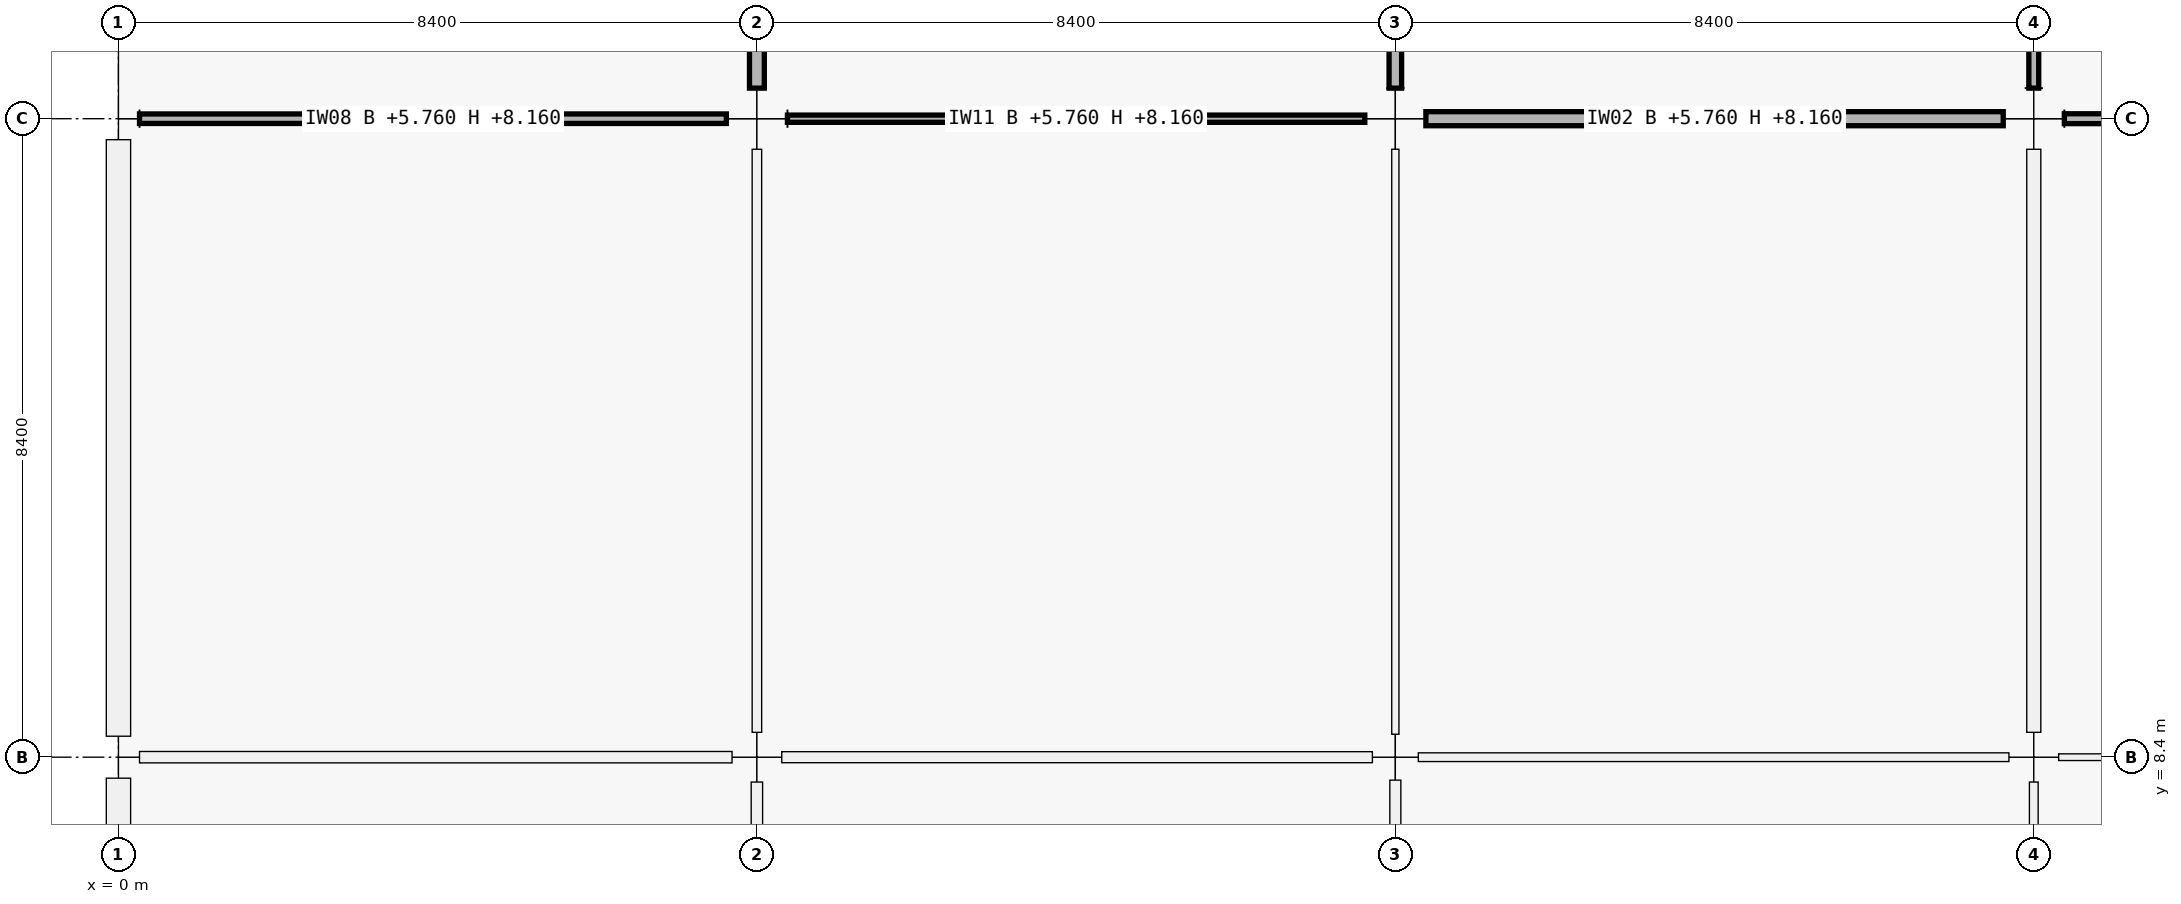
"""IFC4 building model, lengths in metres.
Left out: names, types, materials, properties, quantities, classifications, styles, units other than length and angle.
Written with IfcOpenShell. Run it as: python <this file> out.ifc"""

import sys

from ifc_helpers import new_model, si_unit, direction, frame, frame_2d, origin, origin_2d, place, context, subcontext, project, spatial, rectangle, extrude, element, fill, save


model = new_model("IFC4")
c1 = context("Model", 3, precision=1e-05, world=origin(), true_north=direction((0.0, 1.0)))
c2 = subcontext(c1, "Body", "Model", "MODEL_VIEW")
j1 = project(units=[si_unit("LENGTHUNIT", "METRE"), si_unit("PLANEANGLEUNIT", "RADIAN")], contexts=[c1])
p1 = place(None, origin())
s1 = spatial("IfcSite", under=j1, at=p1, CompositionType="ELEMENT")
p2 = place(p1, origin())
s2 = spatial("IfcBuilding", under=s1, at=p2, CompositionType="ELEMENT")
p3 = place(p2, frame((0.0, 0.0, 5.76)))
s3 = spatial("IfcBuildingStorey", under=s2, at=p3, CompositionType="ELEMENT", Elevation=5.76)
for number, where, z_axis, x_axis in (
    (1, (0.0, 8.4, 0.0), (0.0, 0.0, 1.0), (1.0, 0.0, 0.0)),
    (2, (0.0, 16.8, 0.0), (0.0, 0.0, 1.0), (1.0, 0.0, 0.0)),
):
    element("IfcColumn", number, at=place(p3, frame(where, z_axis=z_axis, x_axis=x_axis)), inside=s3, PredefinedType="COLUMN", context=c2, shape_type="SweptSolid", body=[
        extrude(rectangle(XDim=0.55, YDim=0.55, at=origin_2d()), origin(), (0.0, 0.0, 1.0), 4.2),
    ])
p4 = place(p3, frame((8.4, 8.4, 0.0), z_axis=(0.0, 0.0, 1.0), x_axis=(1.0, 0.0, 0.0)))
e3 = element("IfcColumn", 3, at=p4, inside=s3, PredefinedType="COLUMN", context=c2, shape_type="SweptSolid", body=[
    extrude(rectangle(XDim=0.65, YDim=0.65, at=origin_2d()), origin(), (0.0, 0.0, 1.0), 4.5),
])
p5 = place(p3, frame((8.4, 16.8, 0.0), z_axis=(0.0, 0.0, 1.0), x_axis=(1.0, 0.0, 0.0)))
e4 = element("IfcColumn", 4, at=p5, inside=s3, PredefinedType="COLUMN", context=c2, shape_type="SweptSolid", body=[
    extrude(rectangle(XDim=0.8, YDim=0.8, at=origin_2d()), origin(), (0.0, 0.0, 1.0), 4.5),
])
p6 = place(p3, frame((16.8, 8.4, 0.0), z_axis=(0.0, 0.0, 1.0), x_axis=(1.0, 0.0, 0.0)))
e5 = element("IfcColumn", 5, at=p6, inside=s3, PredefinedType="COLUMN", context=c2, shape_type="SweptSolid", body=[
    extrude(rectangle(XDim=0.6, YDim=0.6, at=origin_2d()), origin(), (0.0, 0.0, 1.0), 4.5),
])
p7 = place(p3, frame((16.8, 16.8, 0.0), z_axis=(0.0, 0.0, 1.0), x_axis=(1.0, 0.0, 0.0)))
e6 = element("IfcColumn", 6, at=p7, inside=s3, PredefinedType="COLUMN", context=c2, shape_type="SweptSolid", body=[
    extrude(rectangle(XDim=0.8, YDim=0.8, at=origin_2d()), origin(), (0.0, 0.0, 1.0), 4.5),
])
p8 = place(p3, frame((25.2, 8.4, 0.0), z_axis=(0.0, 0.0, 1.0), x_axis=(1.0, 0.0, 0.0)))
e7 = element("IfcColumn", 7, at=p8, inside=s3, PredefinedType="COLUMN", context=c2, shape_type="SweptSolid", body=[
    extrude(rectangle(XDim=0.65, YDim=0.65, at=origin_2d()), origin(), (0.0, 0.0, 1.0), 4.5),
])
p9 = place(p3, frame((25.2, 16.8, 0.0), z_axis=(0.0, 0.0, 1.0), x_axis=(1.0, 0.0, 0.0)))
e8 = element("IfcColumn", 8, at=p9, inside=s3, PredefinedType="COLUMN", context=c2, shape_type="SweptSolid", body=[
    extrude(rectangle(XDim=0.8, YDim=0.8, at=origin_2d()), origin(), (0.0, 0.0, 1.0), 4.5),
])
p10 = place(p3, frame((0.0, 0.276, 0.0), z_axis=(0.0, 0.0, 1.0), x_axis=(0.0, 1.0, 0.0)))
e9 = element("IfcWall", 9, at=p10, inside=s3, PredefinedType="SOLIDWALL", context=c2, shape_type="SweptSolid", body=[
    extrude(rectangle(XDim=7.848, YDim=0.32, at=frame_2d((3.924, 0.0))), origin(), (0.0, 0.0, 1.0), 3.4),
])
p11 = place(p10, frame((2.524, 0.0, 0.9)))
e10 = element("IfcOpeningElement", 10, at=p11, cuts=e9, PredefinedType="OPENING", context=c2, shape_type="SweptSolid", body=[
    extrude(rectangle(XDim=2.8, YDim=1.75, at=frame_2d((1.4, 0.875))), frame((0.0, 0.16, 0.0), z_axis=(0.0, -1.0, 0.0), x_axis=(1.0, 0.0, 0.0)), (0.0, 0.0, 1.0), 0.32),
])
p12 = place(p3, frame((0.0, 8.676, 0.0), z_axis=(0.0, 0.0, 1.0), x_axis=(0.0, 1.0, 0.0)))
e11 = element("IfcWall", 11, at=p12, inside=s3, PredefinedType="SOLIDWALL", context=c2, shape_type="SweptSolid", body=[
    extrude(rectangle(XDim=7.848, YDim=0.32, at=frame_2d((3.924, 0.0))), origin(), (0.0, 0.0, 1.0), 3.4),
])
p13 = place(p12, frame((2.974, 0.0, 0.9)))
e12 = element("IfcOpeningElement", 12, at=p13, cuts=e11, PredefinedType="OPENING", context=c2, shape_type="SweptSolid", body=[
    extrude(rectangle(XDim=1.9, YDim=1.75, at=frame_2d((0.95, 0.875))), frame((0.0, 0.16, 0.0), z_axis=(0.0, -1.0, 0.0), x_axis=(1.0, 0.0, 0.0)), (0.0, 0.0, 1.0), 0.32),
])
p14 = place(p3, frame((0.277, 8.4, 0.0), z_axis=(0.0, 0.0, 1.0), x_axis=(1.0, 0.0, 0.0)))
e13 = element("IfcWall", 13, at=p14, inside=s3, PredefinedType="MOVABLE", context=c2, shape_type="SweptSolid", body=[
    extrude(rectangle(XDim=7.796, YDim=0.15, at=frame_2d((3.898, 0.0))), origin(), (0.0, 0.0, 1.0), 2.4),
])
p15 = place(p14, frame((3.358, 0.0, 0.0)))
e14 = element("IfcOpeningElement", 14, at=p15, cuts=e13, PredefinedType="OPENING", context=c2, shape_type="SweptSolid", body=[
    extrude(rectangle(XDim=1.08, YDim=2.22, at=frame_2d((0.54, 1.11))), frame((0.0, 0.075, 0.0), z_axis=(0.0, -1.0, 0.0), x_axis=(1.0, 0.0, 0.0)), (0.0, 0.0, 1.0), 0.15),
])
p16 = place(p3, frame((0.277, 16.8, 0.0), z_axis=(0.0, 0.0, 1.0), x_axis=(1.0, 0.0, 0.0)))
e15 = element("IfcWall", 15, at=p16, inside=s3, PredefinedType="PARTITIONING", context=c2, shape_type="SweptSolid", body=[
    extrude(rectangle(XDim=7.721, YDim=0.125, at=frame_2d((3.86, 0.0))), origin(), (0.0, 0.0, 1.0), 2.4),
])
p17 = place(p16, frame((3.33, 0.0, 0.0)))
e16 = element("IfcOpeningElement", 16, at=p17, cuts=e15, PredefinedType="OPENING", context=c2, shape_type="SweptSolid", body=[
    extrude(rectangle(XDim=1.06, YDim=2.22, at=frame_2d((0.53, 1.11))), frame((0.0, 0.062, 0.0), z_axis=(0.0, -1.0, 0.0), x_axis=(1.0, 0.0, 0.0)), (0.0, 0.0, 1.0), 0.125),
])
p18 = place(p3, frame((8.727, 8.4, 0.0), z_axis=(0.0, 0.0, 1.0), x_axis=(1.0, 0.0, 0.0)))
e17 = element("IfcWall", 17, at=p18, inside=s3, PredefinedType="PARTITIONING", context=c2, shape_type="SweptSolid", body=[
    extrude(rectangle(XDim=7.771, YDim=0.145, at=frame_2d((3.885, 0.0))), origin(), (0.0, 0.0, 1.0), 2.4),
])
p19 = place(p18, frame((3.415, 0.0, 0.0)))
e18 = element("IfcOpeningElement", 18, at=p19, cuts=e17, PredefinedType="OPENING", context=c2, shape_type="SweptSolid", body=[
    extrude(rectangle(XDim=0.94, YDim=2.15, at=frame_2d((0.47, 1.075))), frame((0.0, 0.073, 0.0), z_axis=(0.0, -1.0, 0.0), x_axis=(1.0, 0.0, 0.0)), (0.0, 0.0, 1.0), 0.145),
])
p20 = place(p3, frame((8.802, 16.8, 0.0), z_axis=(0.0, 0.0, 1.0), x_axis=(1.0, 0.0, 0.0)))
e19 = element("IfcWall", 19, at=p20, inside=s3, PredefinedType="PARTITIONING", context=c2, shape_type="SweptSolid", body=[
    extrude(rectangle(XDim=7.596, YDim=0.095, at=frame_2d((3.798, 0.0))), origin(), (0.0, 0.0, 1.0), 2.4),
])
p21 = place(p20, frame((3.258, 0.0, 0.0)))
e20 = element("IfcOpeningElement", 20, at=p21, cuts=e19, PredefinedType="OPENING", context=c2, shape_type="SweptSolid", body=[
    extrude(rectangle(XDim=1.08, YDim=2.22, at=frame_2d((0.54, 1.11))), frame((0.0, 0.047, 0.0), z_axis=(0.0, -1.0, 0.0), x_axis=(1.0, 0.0, 0.0)), (0.0, 0.0, 1.0), 0.095),
])
p22 = place(p3, frame((17.102, 8.4, 0.0), z_axis=(0.0, 0.0, 1.0), x_axis=(1.0, 0.0, 0.0)))
e21 = element("IfcWall", 21, at=p22, inside=s3, PredefinedType="PARTITIONING", context=c2, shape_type="SweptSolid", body=[
    extrude(rectangle(XDim=7.771, YDim=0.115, at=frame_2d((3.885, 0.0))), origin(), (0.0, 0.0, 1.0), 2.4),
])
p23 = place(p22, frame((3.361, 0.0, 0.0)))
e22 = element("IfcOpeningElement", 22, at=p23, cuts=e21, PredefinedType="OPENING", context=c2, shape_type="SweptSolid", body=[
    extrude(rectangle(XDim=1.05, YDim=2.12, at=frame_2d((0.525, 1.06))), frame((0.0, 0.058, 0.0), z_axis=(0.0, -1.0, 0.0), x_axis=(1.0, 0.0, 0.0)), (0.0, 0.0, 1.0), 0.115),
])
p24 = place(p3, frame((17.202, 16.8, 0.0), z_axis=(0.0, 0.0, 1.0), x_axis=(1.0, 0.0, 0.0)))
e23 = element("IfcWall", 23, at=p24, inside=s3, PredefinedType="PARTITIONING", context=c2, shape_type="SweptSolid", body=[
    extrude(rectangle(XDim=7.596, YDim=0.185, at=frame_2d((3.798, 0.0))), origin(), (0.0, 0.0, 1.0), 2.4),
])
p25 = place(p24, frame((3.268, 0.0, 0.0)))
e24 = element("IfcOpeningElement", 24, at=p25, cuts=e23, PredefinedType="OPENING", context=c2, shape_type="SweptSolid", body=[
    extrude(rectangle(XDim=1.06, YDim=2.22, at=frame_2d((0.53, 1.11))), frame((0.0, 0.093, 0.0), z_axis=(0.0, -1.0, 0.0), x_axis=(1.0, 0.0, 0.0)), (0.0, 0.0, 1.0), 0.185),
])
p26 = place(p3, frame((25.527, 8.4, 0.0), z_axis=(0.0, 0.0, 1.0), x_axis=(1.0, 0.0, 0.0)))
e25 = element("IfcWall", 25, at=p26, inside=s3, PredefinedType="PARTITIONING", context=c2, shape_type="SweptSolid", body=[
    extrude(rectangle(XDim=7.771, YDim=0.088, at=frame_2d((3.885, 0.0))), origin(), (0.0, 0.0, 1.0), 2.4),
])
p27 = place(p26, frame((3.381, 0.0, 0.0)))
e26 = element("IfcOpeningElement", 26, at=p27, cuts=e25, PredefinedType="OPENING", context=c2, shape_type="SweptSolid", body=[
    extrude(rectangle(XDim=1.01, YDim=2.12, at=frame_2d((0.505, 1.06))), frame((0.0, 0.044, 0.0), z_axis=(0.0, -1.0, 0.0), x_axis=(1.0, 0.0, 0.0)), (0.0, 0.0, 1.0), 0.088),
])
p28 = place(p3, frame((25.602, 16.8, 0.0), z_axis=(0.0, 0.0, 1.0), x_axis=(1.0, 0.0, 0.0)))
e27 = element("IfcWall", 27, at=p28, inside=s3, PredefinedType="MOVABLE", context=c2, shape_type="SweptSolid", body=[
    extrude(rectangle(XDim=7.596, YDim=0.13, at=frame_2d((3.798, 0.0))), origin(), (0.0, 0.0, 1.0), 2.4),
])
p29 = place(p28, frame((3.313, 0.0, 0.0)))
e28 = element("IfcOpeningElement", 28, at=p29, cuts=e27, PredefinedType="OPENING", context=c2, shape_type="SweptSolid", body=[
    extrude(rectangle(XDim=0.97, YDim=2.12, at=frame_2d((0.485, 1.06))), frame((0.0, 0.065, 0.0), z_axis=(0.0, -1.0, 0.0), x_axis=(1.0, 0.0, 0.0)), (0.0, 0.0, 1.0), 0.13),
])
p30 = place(p3, frame((8.4, 0.277, 0.0), z_axis=(0.0, 0.0, 1.0), x_axis=(0.0, 1.0, 0.0)))
e29 = element("IfcWall", 29, at=p30, inside=s3, PredefinedType="MOVABLE", context=c2, shape_type="SweptSolid", body=[
    extrude(rectangle(XDim=7.796, YDim=0.15, at=frame_2d((3.898, 0.0))), origin(), (0.0, 0.0, 1.0), 2.4),
])
p31 = place(p30, frame((3.388, 0.0, 0.0)))
e30 = element("IfcOpeningElement", 30, at=p31, cuts=e29, PredefinedType="OPENING", context=c2, shape_type="SweptSolid", body=[
    extrude(rectangle(XDim=1.02, YDim=2.2, at=frame_2d((0.51, 1.1))), frame((0.0, 0.075, 0.0), z_axis=(0.0, -1.0, 0.0), x_axis=(1.0, 0.0, 0.0)), (0.0, 0.0, 1.0), 0.15),
])
p32 = place(p3, frame((8.4, 8.727, 0.0), z_axis=(0.0, 0.0, 1.0), x_axis=(0.0, 1.0, 0.0)))
e31 = element("IfcWall", 31, at=p32, inside=s3, PredefinedType="PARTITIONING", context=c2, shape_type="SweptSolid", body=[
    extrude(rectangle(XDim=7.671, YDim=0.125, at=frame_2d((3.835, 0.0))), origin(), (0.0, 0.0, 1.0), 2.4),
])
p33 = place(p32, frame((3.336, 0.0, 0.0)))
e32 = element("IfcOpeningElement", 32, at=p33, cuts=e31, PredefinedType="OPENING", context=c2, shape_type="SweptSolid", body=[
    extrude(rectangle(XDim=1.0, YDim=2.2, at=frame_2d((0.5, 1.1))), frame((0.0, 0.062, 0.0), z_axis=(0.0, -1.0, 0.0), x_axis=(1.0, 0.0, 0.0)), (0.0, 0.0, 1.0), 0.125),
])
p34 = place(p3, frame((8.4, 17.202, 0.0), z_axis=(0.0, 0.0, 1.0), x_axis=(0.0, 1.0, 0.0)))
e33 = element("IfcWall", 33, at=p34, inside=s3, PredefinedType="PARTITIONING", context=c2, shape_type="SweptSolid", body=[
    extrude(rectangle(XDim=7.596, YDim=0.195, at=frame_2d((3.798, 0.0))), origin(), (0.0, 0.0, 1.0), 2.4),
])
p35 = place(p34, frame((3.308, 0.0, 0.0)))
e34 = element("IfcOpeningElement", 34, at=p35, cuts=e33, PredefinedType="OPENING", context=c2, shape_type="SweptSolid", body=[
    extrude(rectangle(XDim=0.98, YDim=2.18, at=frame_2d((0.49, 1.09))), frame((0.0, 0.098, 0.0), z_axis=(0.0, -1.0, 0.0), x_axis=(1.0, 0.0, 0.0)), (0.0, 0.0, 1.0), 0.195),
])
p36 = place(p3, frame((16.8, 0.277, 0.0), z_axis=(0.0, 0.0, 1.0), x_axis=(0.0, 1.0, 0.0)))
e35 = element("IfcWall", 35, at=p36, inside=s3, PredefinedType="PARTITIONING", context=c2, shape_type="SweptSolid", body=[
    extrude(rectangle(XDim=7.821, YDim=0.145, at=frame_2d((3.91, 0.0))), origin(), (0.0, 0.0, 1.0), 2.4),
])
p37 = place(p36, frame((3.45, 0.0, 0.0)))
e36 = element("IfcOpeningElement", 36, at=p37, cuts=e35, PredefinedType="OPENING", context=c2, shape_type="SweptSolid", body=[
    extrude(rectangle(XDim=0.92, YDim=2.15, at=frame_2d((0.46, 1.075))), frame((0.0, 0.073, 0.0), z_axis=(0.0, -1.0, 0.0), x_axis=(1.0, 0.0, 0.0)), (0.0, 0.0, 1.0), 0.145),
])
p38 = place(p3, frame((16.8, 8.702, 0.0), z_axis=(0.0, 0.0, 1.0), x_axis=(0.0, 1.0, 0.0)))
e37 = element("IfcWall", 37, at=p38, inside=s3, PredefinedType="PARTITIONING", context=c2, shape_type="SweptSolid", body=[
    extrude(rectangle(XDim=7.696, YDim=0.095, at=frame_2d((3.848, 0.0))), origin(), (0.0, 0.0, 1.0), 2.4),
])
p39 = place(p38, frame((3.323, 0.0, 0.0)))
e38 = element("IfcOpeningElement", 38, at=p39, cuts=e37, PredefinedType="OPENING", context=c2, shape_type="SweptSolid", body=[
    extrude(rectangle(XDim=1.05, YDim=2.12, at=frame_2d((0.525, 1.06))), frame((0.0, 0.047, 0.0), z_axis=(0.0, -1.0, 0.0), x_axis=(1.0, 0.0, 0.0)), (0.0, 0.0, 1.0), 0.095),
])
p40 = place(p3, frame((16.8, 17.202, 0.0), z_axis=(0.0, 0.0, 1.0), x_axis=(0.0, 1.0, 0.0)))
e39 = element("IfcWall", 39, at=p40, inside=s3, PredefinedType="PARTITIONING", context=c2, shape_type="SweptSolid", body=[
    extrude(rectangle(XDim=7.596, YDim=0.165, at=frame_2d((3.798, 0.0))), origin(), (0.0, 0.0, 1.0), 2.4),
])
p41 = place(p40, frame((3.293, 0.0, 0.0)))
e40 = element("IfcOpeningElement", 40, at=p41, cuts=e39, PredefinedType="OPENING", context=c2, shape_type="SweptSolid", body=[
    extrude(rectangle(XDim=1.01, YDim=2.12, at=frame_2d((0.505, 1.06))), frame((0.0, 0.083, 0.0), z_axis=(0.0, -1.0, 0.0), x_axis=(1.0, 0.0, 0.0)), (0.0, 0.0, 1.0), 0.165),
])
p42 = place(p3, frame((25.2, 0.277, 0.0), z_axis=(0.0, 0.0, 1.0), x_axis=(0.0, 1.0, 0.0)))
e41 = element("IfcWall", 41, at=p42, inside=s3, PredefinedType="PARTITIONING", context=c2, shape_type="SweptSolid", body=[
    extrude(rectangle(XDim=7.796, YDim=0.115, at=frame_2d((3.898, 0.0))), origin(), (0.0, 0.0, 1.0), 2.4),
])
p43 = place(p42, frame((3.358, 0.0, 0.0)))
e42 = element("IfcOpeningElement", 42, at=p43, cuts=e41, PredefinedType="OPENING", context=c2, shape_type="SweptSolid", body=[
    extrude(rectangle(XDim=1.08, YDim=2.22, at=frame_2d((0.54, 1.11))), frame((0.0, 0.058, 0.0), z_axis=(0.0, -1.0, 0.0), x_axis=(1.0, 0.0, 0.0)), (0.0, 0.0, 1.0), 0.115),
])
p44 = place(p3, frame((25.2, 8.727, 0.0), z_axis=(0.0, 0.0, 1.0), x_axis=(0.0, 1.0, 0.0)))
e43 = element("IfcWall", 43, at=p44, inside=s3, PredefinedType="PARTITIONING", context=c2, shape_type="SweptSolid", body=[
    extrude(rectangle(XDim=7.671, YDim=0.185, at=frame_2d((3.835, 0.0))), origin(), (0.0, 0.0, 1.0), 2.4),
])
p45 = place(p44, frame((3.306, 0.0, 0.0)))
e44 = element("IfcOpeningElement", 44, at=p45, cuts=e43, PredefinedType="OPENING", context=c2, shape_type="SweptSolid", body=[
    extrude(rectangle(XDim=1.06, YDim=2.22, at=frame_2d((0.53, 1.11))), frame((0.0, 0.093, 0.0), z_axis=(0.0, -1.0, 0.0), x_axis=(1.0, 0.0, 0.0)), (0.0, 0.0, 1.0), 0.185),
])
p46 = place(p3, frame((25.2, 17.202, 0.0), z_axis=(0.0, 0.0, 1.0), x_axis=(0.0, 1.0, 0.0)))
e45 = element("IfcWall", 45, at=p46, inside=s3, PredefinedType="MOVABLE", context=c2, shape_type="SweptSolid", body=[
    extrude(rectangle(XDim=7.596, YDim=0.13, at=frame_2d((3.798, 0.0))), origin(), (0.0, 0.0, 1.0), 2.4),
])
p47 = place(p46, frame((3.278, 0.0, 0.0)))
e46 = element("IfcOpeningElement", 46, at=p47, cuts=e45, PredefinedType="OPENING", context=c2, shape_type="SweptSolid", body=[
    extrude(rectangle(XDim=1.04, YDim=2.2, at=frame_2d((0.52, 1.1))), frame((0.0, 0.065, 0.0), z_axis=(0.0, -1.0, 0.0), x_axis=(1.0, 0.0, 0.0)), (0.0, 0.0, 1.0), 0.13),
])
p48 = place(p13, origin())
e47 = element("IfcWindow", 47, at=p48, inside=s3, PartitioningType="SINGLE_PANEL", PredefinedType="WINDOW", context=c2, shape_type="SweptSolid", body=[
    extrude(rectangle(XDim=1.9, YDim=1.75, at=frame_2d((0.95, 0.875))), frame((0.0, 0.03, 0.0), z_axis=(0.0, -1.0, 0.0), x_axis=(1.0, 0.0, 0.0)), (0.0, 0.0, 1.0), 0.06),
])
fill(e12, e47)
p49 = place(p15, origin())
e48 = element("IfcDoor", 48, at=p49, inside=s3, OperationType="SINGLE_SWING_LEFT", PredefinedType="DOOR", context=c2, shape_type="SweptSolid", body=[
    extrude(rectangle(XDim=1.08, YDim=2.22, at=frame_2d((0.54, 1.11))), frame((0.0, 0.025, 0.0), z_axis=(0.0, -1.0, 0.0), x_axis=(1.0, 0.0, 0.0)), (0.0, 0.0, 1.0), 0.05),
])
fill(e14, e48)
p50 = place(p17, origin())
e49 = element("IfcDoor", 49, at=p50, inside=s3, OperationType="SINGLE_SWING_RIGHT", PredefinedType="DOOR", context=c2, shape_type="SweptSolid", body=[
    extrude(rectangle(XDim=1.06, YDim=2.22, at=frame_2d((0.53, 1.11))), frame((0.0, 0.025, 0.0), z_axis=(0.0, -1.0, 0.0), x_axis=(1.0, 0.0, 0.0)), (0.0, 0.0, 1.0), 0.05),
])
fill(e16, e49)
p51 = place(p19, origin())
e50 = element("IfcDoor", 50, at=p51, inside=s3, OperationType="SINGLE_SWING_RIGHT", PredefinedType="DOOR", context=c2, shape_type="SweptSolid", body=[
    extrude(rectangle(XDim=0.94, YDim=2.15, at=frame_2d((0.47, 1.075))), frame((0.0, 0.025, 0.0), z_axis=(0.0, -1.0, 0.0), x_axis=(1.0, 0.0, 0.0)), (0.0, 0.0, 1.0), 0.05),
])
fill(e18, e50)
p52 = place(p23, origin())
e51 = element("IfcDoor", 51, at=p52, inside=s3, OperationType="SINGLE_SWING_RIGHT", PredefinedType="DOOR", context=c2, shape_type="SweptSolid", body=[
    extrude(rectangle(XDim=1.05, YDim=2.12, at=frame_2d((0.525, 1.06))), frame((0.0, 0.025, 0.0), z_axis=(0.0, -1.0, 0.0), x_axis=(1.0, 0.0, 0.0)), (0.0, 0.0, 1.0), 0.05),
])
fill(e22, e51)
p53 = place(p21, origin())
e52 = element("IfcDoor", 52, at=p53, inside=s3, OperationType="SINGLE_SWING_RIGHT", PredefinedType="DOOR", context=c2, shape_type="SweptSolid", body=[
    extrude(rectangle(XDim=1.08, YDim=2.22, at=frame_2d((0.54, 1.11))), frame((0.0, 0.025, 0.0), z_axis=(0.0, -1.0, 0.0), x_axis=(1.0, 0.0, 0.0)), (0.0, 0.0, 1.0), 0.05),
])
fill(e20, e52)
p54 = place(p25, origin())
e53 = element("IfcDoor", 53, at=p54, inside=s3, OperationType="SINGLE_SWING_LEFT", PredefinedType="DOOR", context=c2, shape_type="SweptSolid", body=[
    extrude(rectangle(XDim=1.06, YDim=2.22, at=frame_2d((0.53, 1.11))), frame((0.0, 0.025, 0.0), z_axis=(0.0, -1.0, 0.0), x_axis=(1.0, 0.0, 0.0)), (0.0, 0.0, 1.0), 0.05),
])
fill(e24, e53)
p55 = place(p33, origin())
e54 = element("IfcDoor", 54, at=p55, inside=s3, OperationType="SINGLE_SWING_LEFT", PredefinedType="DOOR", context=c2, shape_type="SweptSolid", body=[
    extrude(rectangle(XDim=1.0, YDim=2.2, at=frame_2d((0.5, 1.1))), frame((0.0, 0.025, 0.0), z_axis=(0.0, -1.0, 0.0), x_axis=(1.0, 0.0, 0.0)), (0.0, 0.0, 1.0), 0.05),
])
fill(e32, e54)
p56 = place(p39, origin())
e55 = element("IfcDoor", 55, at=p56, inside=s3, OperationType="SINGLE_SWING_RIGHT", PredefinedType="DOOR", context=c2, shape_type="SweptSolid", body=[
    extrude(rectangle(XDim=1.05, YDim=2.12, at=frame_2d((0.525, 1.06))), frame((0.0, 0.025, 0.0), z_axis=(0.0, -1.0, 0.0), x_axis=(1.0, 0.0, 0.0)), (0.0, 0.0, 1.0), 0.05),
])
fill(e38, e55)
p57 = place(p45, origin())
e56 = element("IfcDoor", 56, at=p57, inside=s3, OperationType="SINGLE_SWING_LEFT", PredefinedType="DOOR", context=c2, shape_type="SweptSolid", body=[
    extrude(rectangle(XDim=1.06, YDim=2.22, at=frame_2d((0.53, 1.11))), frame((0.0, 0.025, 0.0), z_axis=(0.0, -1.0, 0.0), x_axis=(1.0, 0.0, 0.0)), (0.0, 0.0, 1.0), 0.05),
])
fill(e44, e56)
save(model, sys.argv[1])
